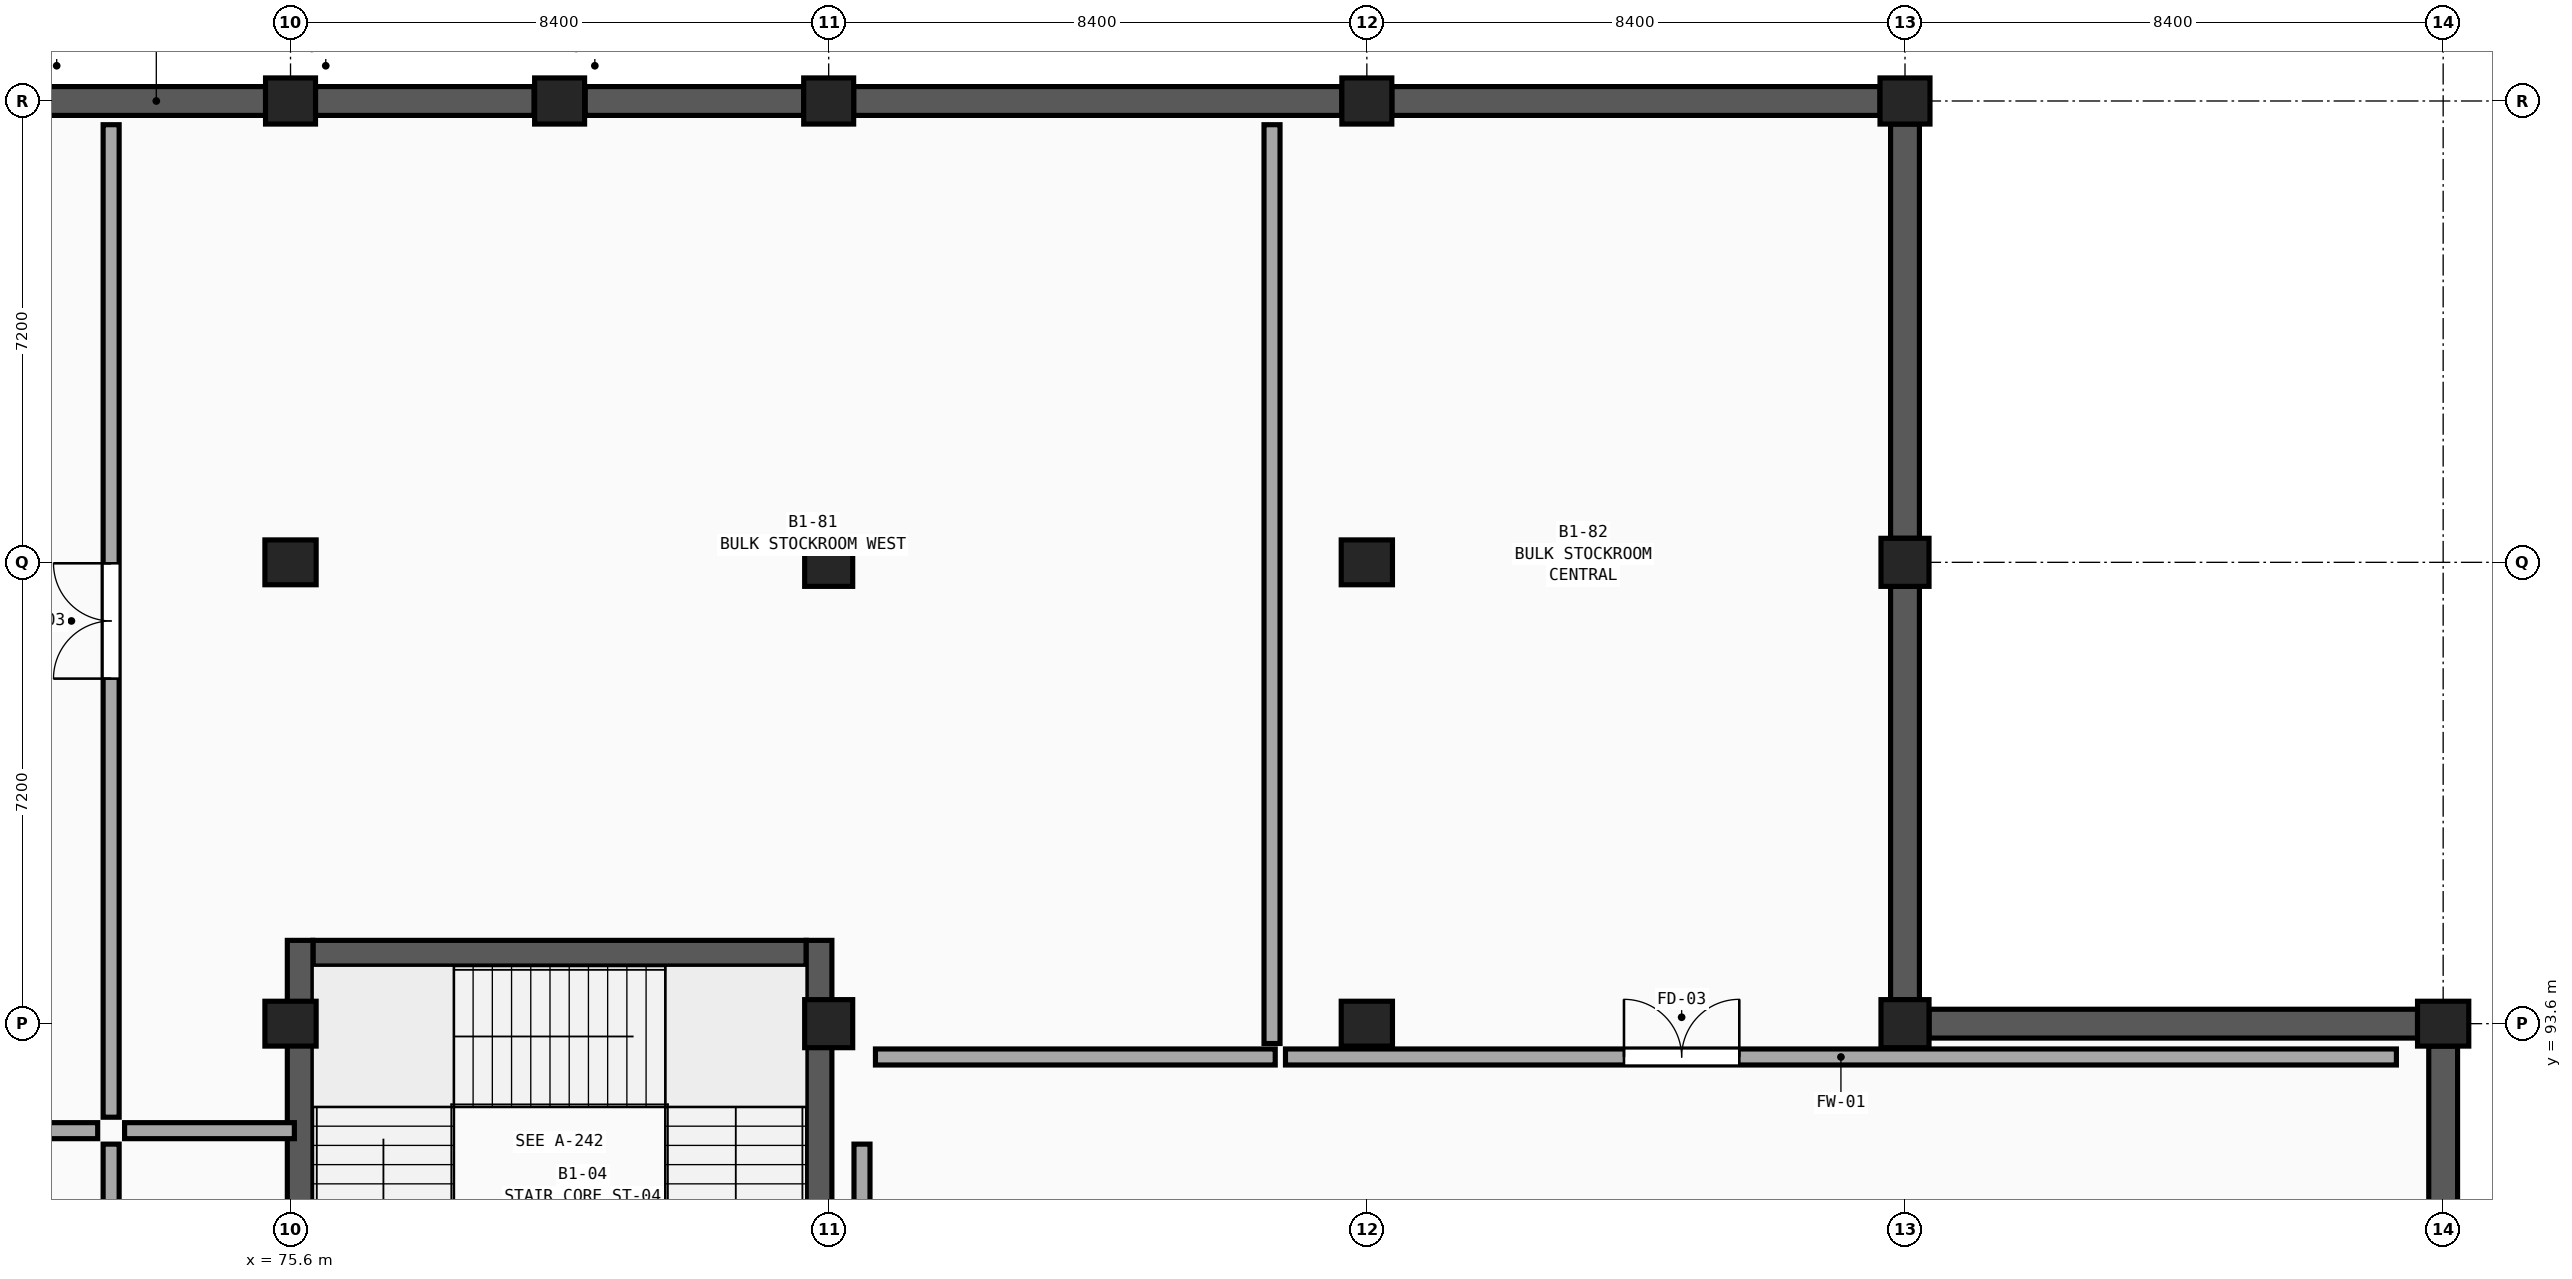
"""IFC4 building model, lengths in metres.
Left out: names, types, materials, properties, quantities, classifications, styles, units other than length and angle.
Written with IfcOpenShell. Run it as: python <this file> out.ifc"""

import sys

from ifc_helpers import new_model, si_unit, direction, frame, frame_2d, origin, origin_2d, place, context, subcontext, project, spatial, rectangle, extrude, element, fill, save


model = new_model("IFC4")
c1 = context("Model", 3, precision=1e-05, world=origin(), true_north=direction((0.0, 1.0)))
c2 = subcontext(c1, "Body", "Model", "MODEL_VIEW")
j1 = project(units=[si_unit("LENGTHUNIT", "METRE"), si_unit("PLANEANGLEUNIT", "RADIAN")], contexts=[c1])
p1 = place(None, origin())
s1 = spatial("IfcSite", under=j1, at=p1, CompositionType="ELEMENT")
p2 = place(p1, origin())
s2 = spatial("IfcBuilding", under=s1, at=p2, CompositionType="ELEMENT")
p3 = place(p2, frame((0.0, 0.0, -5.4)))
s3 = spatial("IfcBuildingStorey", under=s2, at=p3, CompositionType="ELEMENT", Elevation=-5.4)
for number, where, z_axis, x_axis in (
    (1, (75.6, 93.6, 0.0), (0.0, 0.0, 1.0), (1.0, 0.0, 0.0)),
    (2, (75.6, 100.8, 0.0), (0.0, 0.0, 1.0), (1.0, 0.0, 0.0)),
):
    element("IfcColumn", number, at=place(p3, frame(where, z_axis=z_axis, x_axis=x_axis)), inside=s3, PredefinedType="COLUMN", context=c2, shape_type="SweptSolid", body=[
        extrude(rectangle(XDim=0.8, YDim=0.7, at=origin_2d()), origin(), (0.0, 0.0, 1.0), 5.4),
    ])
p4 = place(p3, frame((75.6, 108.0, 0.0), z_axis=(0.0, 0.0, 1.0), x_axis=(1.0, 0.0, 0.0)))
e3 = element("IfcColumn", 3, at=p4, inside=s3, PredefinedType="PILASTER", context=c2, shape_type="SweptSolid", body=[
    extrude(rectangle(XDim=0.78, YDim=0.72, at=origin_2d()), origin(), (0.0, 0.0, 1.0), 5.4),
])
for number, where, z_axis, x_axis in (
    (4, (84.0, 93.6, 0.0), (0.0, 0.0, 1.0), (1.0, 0.0, 0.0)),
    (5, (84.0, 100.8, 0.0), (0.0, 0.0, 1.0), (1.0, 0.0, 0.0)),
):
    element("IfcColumn", number, at=place(p3, frame(where, z_axis=z_axis, x_axis=x_axis)), inside=s3, PredefinedType="COLUMN", context=c2, shape_type="SweptSolid", body=[
        extrude(rectangle(XDim=0.75, YDim=0.75, at=origin_2d()), origin(), (0.0, 0.0, 1.0), 5.4),
    ])
p5 = place(p3, frame((84.0, 108.0, 0.0), z_axis=(0.0, 0.0, 1.0), x_axis=(1.0, 0.0, 0.0)))
e6 = element("IfcColumn", 6, at=p5, inside=s3, PredefinedType="PILASTER", context=c2, shape_type="SweptSolid", body=[
    extrude(rectangle(XDim=0.78, YDim=0.72, at=origin_2d()), origin(), (0.0, 0.0, 1.0), 5.4),
])
for number, where, z_axis, x_axis in (
    (7, (92.4, 93.6, 0.0), (0.0, 0.0, 1.0), (1.0, 0.0, 0.0)),
    (8, (92.4, 100.8, 0.0), (0.0, 0.0, 1.0), (1.0, 0.0, 0.0)),
):
    element("IfcColumn", number, at=place(p3, frame(where, z_axis=z_axis, x_axis=x_axis)), inside=s3, PredefinedType="COLUMN", context=c2, shape_type="SweptSolid", body=[
        extrude(rectangle(XDim=0.8, YDim=0.7, at=origin_2d()), origin(), (0.0, 0.0, 1.0), 5.4),
    ])
p6 = place(p3, frame((92.4, 108.0, 0.0), z_axis=(0.0, 0.0, 1.0), x_axis=(1.0, 0.0, 0.0)))
e9 = element("IfcColumn", 9, at=p6, inside=s3, PredefinedType="PILASTER", context=c2, shape_type="SweptSolid", body=[
    extrude(rectangle(XDim=0.78, YDim=0.72, at=origin_2d()), origin(), (0.0, 0.0, 1.0), 5.4),
])
for number, where, z_axis, x_axis in (
    (10, (100.8, 93.6, 0.0), (0.0, 0.0, 1.0), (1.0, 0.0, 0.0)),
    (11, (100.8, 100.8, 0.0), (0.0, 0.0, 1.0), (1.0, 0.0, 0.0)),
):
    element("IfcColumn", number, at=place(p3, frame(where, z_axis=z_axis, x_axis=x_axis)), inside=s3, PredefinedType="COLUMN", context=c2, shape_type="SweptSolid", body=[
        extrude(rectangle(XDim=0.75, YDim=0.75, at=origin_2d()), origin(), (0.0, 0.0, 1.0), 5.4),
    ])
p7 = place(p3, frame((100.8, 108.0, 0.0), z_axis=(0.0, 0.0, 1.0), x_axis=(1.0, 0.0, 0.0)))
e12 = element("IfcColumn", 12, at=p7, inside=s3, PredefinedType="PILASTER", context=c2, shape_type="SweptSolid", body=[
    extrude(rectangle(XDim=0.78, YDim=0.72, at=origin_2d()), origin(), (0.0, 0.0, 1.0), 5.4),
])
p8 = place(p3, frame((109.2, 93.6, 0.0), z_axis=(0.0, 0.0, 1.0), x_axis=(1.0, 0.0, 0.0)))
e13 = element("IfcColumn", 13, at=p8, inside=s3, PredefinedType="COLUMN", context=c2, shape_type="SweptSolid", body=[
    extrude(rectangle(XDim=0.8, YDim=0.7, at=origin_2d()), origin(), (0.0, 0.0, 1.0), 5.4),
])
p9 = place(p3, frame((79.8, 108.0, 0.0), z_axis=(0.0, 0.0, 1.0), x_axis=(1.0, 0.0, 0.0)))
e14 = element("IfcColumn", 14, at=p9, inside=s3, PredefinedType="PILASTER", context=c2, shape_type="SweptSolid", body=[
    extrude(rectangle(XDim=0.78, YDim=0.72, at=origin_2d()), origin(), (0.0, 0.0, 1.0), 5.4),
])
for number, where, z_axis, x_axis in (
    (15, (71.8, 108.0, 0.0), (0.0, 0.0, 1.0), (1.0, 0.0, 0.0)),
    (16, (75.99, 108.0, 0.0), (0.0, 0.0, 1.0), (1.0, 0.0, 0.0)),
):
    element("IfcWall", number, at=place(p3, frame(where, z_axis=z_axis, x_axis=x_axis)), inside=s3, PredefinedType="USERDEFINED", context=c2, shape_type="SweptSolid", body=[
        extrude(rectangle(XDim=3.41, YDim=0.45, at=frame_2d((1.705, 0.0))), origin(), (0.0, 0.0, 1.0), 4.5),
    ])
p10 = place(p3, frame((80.2, 108.0, 0.0), z_axis=(0.0, 0.0, 1.0), x_axis=(1.0, 0.0, 0.0)))
e17 = element("IfcWall", 17, at=p10, inside=s3, PredefinedType="USERDEFINED", context=c2, shape_type="SweptSolid", body=[
    extrude(rectangle(XDim=3.41, YDim=0.45, at=frame_2d((1.705, 0.0))), origin(), (0.0, 0.0, 1.0), 4.5),
])
p11 = place(p3, frame((84.39, 108.0, 0.0), z_axis=(0.0, 0.0, 1.0), x_axis=(1.0, 0.0, 0.0)))
e18 = element("IfcWall", 18, at=p11, inside=s3, PredefinedType="USERDEFINED", context=c2, shape_type="SweptSolid", body=[
    extrude(rectangle(XDim=7.62, YDim=0.45, at=frame_2d((3.81, 0.0))), origin(), (0.0, 0.0, 1.0), 4.5),
])
p12 = place(p3, frame((100.8, 100.425, 0.0), z_axis=(0.0, 0.0, 1.0), x_axis=(0.0, -1.0, 0.0)))
e19 = element("IfcWall", 19, at=p12, inside=s3, PredefinedType="USERDEFINED", context=c2, shape_type="SweptSolid", body=[
    extrude(rectangle(XDim=6.45, YDim=0.45, at=frame_2d((3.225, 0.0))), origin(), (0.0, 0.0, 1.0), 4.5),
])
p13 = place(p3, frame((100.8, 107.64, 0.0), z_axis=(0.0, 0.0, 1.0), x_axis=(0.0, -1.0, 0.0)))
e20 = element("IfcWall", 20, at=p13, inside=s3, PredefinedType="USERDEFINED", context=c2, shape_type="SweptSolid", body=[
    extrude(rectangle(XDim=6.465, YDim=0.45, at=frame_2d((3.232, 0.0))), origin(), (0.0, 0.0, 1.0), 4.5),
])
p14 = place(p3, frame((92.79, 108.0, 0.0), z_axis=(0.0, 0.0, 1.0), x_axis=(1.0, 0.0, 0.0)))
e21 = element("IfcWall", 21, at=p14, inside=s3, PredefinedType="USERDEFINED", context=c2, shape_type="SweptSolid", body=[
    extrude(rectangle(XDim=7.62, YDim=0.45, at=frame_2d((3.81, 0.0))), origin(), (0.0, 0.0, 1.0), 4.5),
])
p15 = place(p3, frame((109.2, 93.25, 0.0), z_axis=(0.0, 0.0, 1.0), x_axis=(0.0, -1.0, 0.0)))
e22 = element("IfcWall", 22, at=p15, inside=s3, PredefinedType="USERDEFINED", context=c2, shape_type="SweptSolid", body=[
    extrude(rectangle(XDim=6.5, YDim=0.45, at=frame_2d((3.25, 0.0))), origin(), (0.0, 0.0, 1.0), 4.5),
])
p16 = place(p3, frame((101.175, 93.6, 0.0), z_axis=(0.0, 0.0, 1.0), x_axis=(1.0, 0.0, 0.0)))
e23 = element("IfcWall", 23, at=p16, inside=s3, PredefinedType="USERDEFINED", context=c2, shape_type="SweptSolid", body=[
    extrude(rectangle(XDim=7.625, YDim=0.45, at=frame_2d((3.812, 0.0))), origin(), (0.0, 0.0, 1.0), 4.5),
])
p17 = place(p3, frame((75.95, 94.7, 0.0), z_axis=(0.0, 0.0, 1.0), x_axis=(1.0, 0.0, 0.0)))
e24 = element("IfcWall", 24, at=p17, inside=s3, PredefinedType="SHEAR", context=c2, shape_type="SweptSolid", body=[
    extrude(rectangle(XDim=7.7, YDim=0.4, at=frame_2d((3.85, 0.0))), origin(), (0.0, 0.0, 1.0), 5.4),
])
for number, where, z_axis, x_axis in (
    (25, (75.75, 94.9, 0.0), (0.0, 0.0, 1.0), (0.0, -1.0, 0.0)),
    (26, (83.85, 86.45, 0.0), (0.0, 0.0, 1.0), (0.0, 1.0, 0.0)),
):
    element("IfcWall", number, at=place(p3, frame(where, z_axis=z_axis, x_axis=x_axis)), inside=s3, PredefinedType="SHEAR", context=c2, shape_type="SweptSolid", body=[
        extrude(rectangle(XDim=8.45, YDim=0.4, at=frame_2d((4.225, 0.0))), origin(), (0.0, 0.0, 1.0), 5.4),
    ])
p18 = place(p3, frame((54.89, 91.93, 0.0), z_axis=(0.0, 0.0, 1.0), x_axis=(1.0, 0.0, 0.0)))
e27 = element("IfcWall", 27, at=p18, inside=s3, PredefinedType="SOLIDWALL", context=c2, shape_type="SweptSolid", body=[
    extrude(rectangle(XDim=17.7, YDim=0.25, at=frame_2d((8.85, 0.0))), origin(), (0.0, 0.0, 1.0), 5.05),
])
p19 = place(p18, frame((8.325, 0.0, 0.0)))
e28 = element("IfcOpeningElement", 28, at=p19, cuts=e27, PredefinedType="OPENING", context=c2, shape_type="SweptSolid", body=[
    extrude(rectangle(XDim=1.05, YDim=2.15, at=frame_2d((0.525, 1.075))), frame((0.0, 0.145, 0.0), z_axis=(0.0, -1.0, 0.0), x_axis=(1.0, 0.0, 0.0)), (0.0, 0.0, 1.0), 0.29),
])
p20 = place(p3, frame((91.13, 93.08, 0.0), z_axis=(0.0, 0.0, 1.0), x_axis=(1.0, 0.0, 0.0)))
e29 = element("IfcWall", 29, at=p20, inside=s3, PredefinedType="SOLIDWALL", context=c2, shape_type="SweptSolid", body=[
    extrude(rectangle(XDim=17.34, YDim=0.25, at=frame_2d((8.67, 0.0))), origin(), (0.0, 0.0, 1.0), 4.5),
])
p21 = place(p20, frame((5.284, 0.0, 0.0)))
e30 = element("IfcOpeningElement", 30, at=p21, cuts=e29, PredefinedType="OPENING", context=c2, shape_type="SweptSolid", body=[
    extrude(rectangle(XDim=1.8, YDim=2.3, at=frame_2d((0.9, 1.15))), frame((0.0, 0.145, 0.0), z_axis=(0.0, -1.0, 0.0), x_axis=(1.0, 0.0, 0.0)), (0.0, 0.0, 1.0), 0.29),
])
p22 = place(p3, frame((72.8, 92.14, 0.0), z_axis=(0.0, 0.0, 1.0), x_axis=(0.0, 1.0, 0.0)))
e31 = element("IfcWall", 31, at=p22, inside=s3, PredefinedType="SOLIDWALL", context=c2, shape_type="SweptSolid", body=[
    extrude(rectangle(XDim=15.49, YDim=0.25, at=frame_2d((7.745, 0.0))), origin(), (0.0, 0.0, 1.0), 5.05),
])
p23 = place(p22, frame((6.845, 0.0, 0.0)))
e32 = element("IfcOpeningElement", 32, at=p23, cuts=e31, PredefinedType="OPENING", context=c2, shape_type="SweptSolid", body=[
    extrude(rectangle(XDim=1.8, YDim=2.3, at=frame_2d((0.9, 1.15))), frame((0.0, 0.145, 0.0), z_axis=(0.0, -1.0, 0.0), x_axis=(1.0, 0.0, 0.0)), (0.0, 0.0, 1.0), 0.29),
])
p24 = place(p3, frame((84.52, 77.01, 0.0), z_axis=(0.0, 0.0, 1.0), x_axis=(0.0, 1.0, 0.0)))
e33 = element("IfcWall", 33, at=p24, inside=s3, PredefinedType="SOLIDWALL", context=c2, shape_type="SweptSolid", body=[
    extrude(rectangle(XDim=14.71, YDim=0.25, at=frame_2d((7.355, 0.0))), origin(), (0.0, 0.0, 1.0), 4.55),
])
p25 = place(p3, frame((90.92, 93.29, 0.0), z_axis=(0.0, 0.0, 1.0), x_axis=(0.0, 1.0, 0.0)))
e34 = element("IfcWall", 34, at=p25, inside=s3, PredefinedType="SOLIDWALL", context=c2, shape_type="SweptSolid", body=[
    extrude(rectangle(XDim=14.34, YDim=0.25, at=frame_2d((7.17, 0.0))), origin(), (0.0, 0.0, 1.0), 5.05),
])
p26 = place(p3, frame((84.73, 93.08, 0.0), z_axis=(0.0, 0.0, 1.0), x_axis=(1.0, 0.0, 0.0)))
e35 = element("IfcWall", 35, at=p26, inside=s3, PredefinedType="SOLIDWALL", context=c2, shape_type="SweptSolid", body=[
    extrude(rectangle(XDim=6.24, YDim=0.25, at=frame_2d((3.12, 0.0))), origin(), (0.0, 0.0, 1.0), 4.55),
])
p27 = place(p3, frame((72.8, 86.44, 0.0), z_axis=(0.0, 0.0, 1.0), x_axis=(0.0, 1.0, 0.0)))
e36 = element("IfcWall", 36, at=p27, inside=s3, PredefinedType="SOLIDWALL", context=c2, shape_type="SweptSolid", body=[
    extrude(rectangle(XDim=5.28, YDim=0.25, at=frame_2d((2.64, 0.0))), origin(), (0.0, 0.0, 1.0), 5.05),
])
p28 = place(p3, frame((73.01, 91.93, 0.0), z_axis=(0.0, 0.0, 1.0), x_axis=(1.0, 0.0, 0.0)))
e37 = element("IfcWall", 37, at=p28, inside=s3, PredefinedType="SOLIDWALL", context=c2, shape_type="SweptSolid", body=[
    extrude(rectangle(XDim=2.65, YDim=0.25, at=frame_2d((1.325, 0.0))), origin(), (0.0, 0.0, 1.0), 5.05),
])
p29 = place(p21, origin())
e38 = element("IfcDoor", 38, at=p29, inside=s3, OperationType="DOUBLE_DOOR_SINGLE_SWING", PredefinedType="DOOR", context=c2, shape_type="SweptSolid", body=[
    extrude(rectangle(XDim=1.8, YDim=2.3, at=frame_2d((0.9, 1.15))), frame((0.0, 0.025, 0.0), z_axis=(0.0, -1.0, 0.0), x_axis=(1.0, 0.0, 0.0)), (0.0, 0.0, 1.0), 0.05),
])
fill(e30, e38)
p30 = place(p23, origin())
e39 = element("IfcDoor", 39, at=p30, inside=s3, OperationType="DOUBLE_DOOR_SINGLE_SWING", PredefinedType="DOOR", context=c2, shape_type="SweptSolid", body=[
    extrude(rectangle(XDim=1.8, YDim=2.3, at=frame_2d((0.9, 1.15))), frame((0.0, 0.025, 0.0), z_axis=(0.0, -1.0, 0.0), x_axis=(1.0, 0.0, 0.0)), (0.0, 0.0, 1.0), 0.05),
])
fill(e32, e39)
save(model, sys.argv[1])
